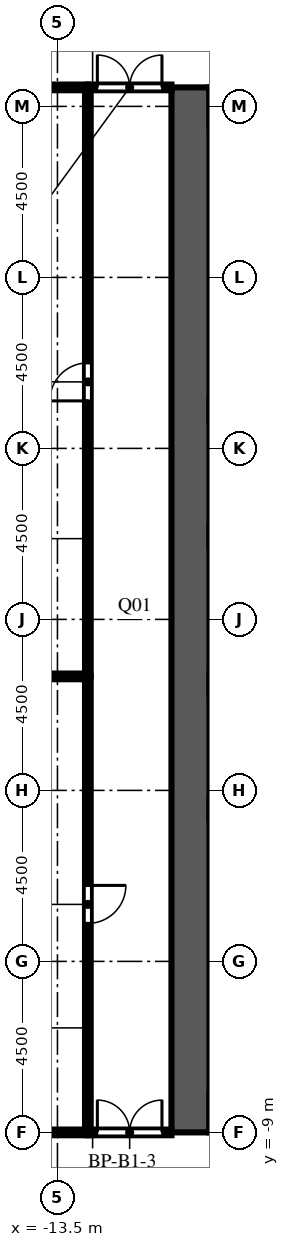
"""IFC4 building model, lengths in metres.
Left out: names, types, materials, properties, quantities, classifications, styles, units other than length and angle.
Written with IfcOpenShell. Run it as: python <this file> out.ifc"""

import sys

from ifc_helpers import new_model, si_unit, direction, frame, frame_2d, origin, place, context, subcontext, project, spatial, rectangle, extrude, element, fill, save


model = new_model("IFC4")
c1 = context("Model", 3, precision=1e-05, world=origin(), true_north=direction((0.0, 1.0)))
c2 = subcontext(c1, "Body", "Model", "MODEL_VIEW")
j1 = project(units=[si_unit("LENGTHUNIT", "METRE"), si_unit("PLANEANGLEUNIT", "RADIAN")], contexts=[c1])
p1 = place(None, origin())
s1 = spatial("IfcSite", under=j1, at=p1, CompositionType="ELEMENT")
p2 = place(p1, origin())
s2 = spatial("IfcBuilding", under=s1, at=p2, CompositionType="ELEMENT")
p3 = place(p2, frame((0.0, 0.0, -5.0)))
s3 = spatial("IfcBuildingStorey", under=s2, at=p3, CompositionType="ELEMENT", Elevation=-5.0)
p4 = place(p3, frame((-10.0, -9.0, 0.0), z_axis=(0.0, 0.0, 1.0), x_axis=(0.0, 1.0, 0.0)))
e1 = element("IfcWall", 1, at=p4, inside=s3, PredefinedType="SHEAR", context=c2, shape_type="SweptSolid", body=[
    extrude(rectangle(XDim=27.5, YDim=1.0, at=frame_2d((13.75, 0.0))), origin(), (0.0, 0.0, 1.0), 5.0),
])
p5 = place(p4, frame((12.55, 0.0, 0.0)))
e2 = element("IfcOpeningElement", 2, at=p5, cuts=e1, PredefinedType="OPENING", context=c2, shape_type="SweptSolid", body=[
    extrude(rectangle(XDim=2.4, YDim=2.4, at=frame_2d((1.2, 1.2))), frame((0.0, 0.51, 0.0), z_axis=(0.0, -1.0, 0.0), x_axis=(1.0, 0.0, 0.0)), (0.0, 0.0, 1.0), 1.02),
])
p6 = place(p4, frame((6.825, 0.0, 0.0)))
e3 = element("IfcOpeningElement", 3, at=p6, cuts=e1, PredefinedType="OPENING", context=c2, shape_type="SweptSolid", body=[
    extrude(rectangle(XDim=1.2, YDim=2.1, at=frame_2d((0.6, 1.05))), frame((0.0, 0.51, 0.0), z_axis=(0.0, -1.0, 0.0), x_axis=(1.0, 0.0, 0.0)), (0.0, 0.0, 1.0), 1.02),
])
p7 = place(p4, frame((19.475, 0.0, 0.0)))
e4 = element("IfcOpeningElement", 4, at=p7, cuts=e1, PredefinedType="OPENING", context=c2, shape_type="SweptSolid", body=[
    extrude(rectangle(XDim=1.2, YDim=2.1, at=frame_2d((0.6, 1.05))), frame((0.0, 0.51, 0.0), z_axis=(0.0, -1.0, 0.0), x_axis=(1.0, 0.0, 0.0)), (0.0, 0.0, 1.0), 1.02),
])
p8 = place(p3, frame((-12.7, -9.0, 0.0), z_axis=(0.0, 0.0, 1.0), x_axis=(1.0, 0.0, 0.0)))
e5 = element("IfcWall", 5, at=p8, inside=s3, PredefinedType="PARTITIONING", context=c2, shape_type="SweptSolid", body=[
    extrude(rectangle(XDim=2.2, YDim=0.15, at=frame_2d((1.1, 0.0))), origin(), (0.0, 0.0, 1.0), 4.5),
])
p9 = place(p8, frame((0.25, 0.0, 0.0)))
e6 = element("IfcOpeningElement", 6, at=p9, cuts=e5, PredefinedType="OPENING", context=c2, shape_type="SweptSolid", body=[
    extrude(rectangle(XDim=1.7, YDim=2.1, at=frame_2d((0.85, 1.05))), frame((0.0, 0.085, 0.0), z_axis=(0.0, -1.0, 0.0), x_axis=(1.0, 0.0, 0.0)), (0.0, 0.0, 1.0), 0.17),
])
p10 = place(p3, frame((-12.7, 18.5, 0.0), z_axis=(0.0, 0.0, 1.0), x_axis=(1.0, 0.0, 0.0)))
e7 = element("IfcWall", 7, at=p10, inside=s3, PredefinedType="PARTITIONING", context=c2, shape_type="SweptSolid", body=[
    extrude(rectangle(XDim=2.2, YDim=0.15, at=frame_2d((1.1, 0.0))), origin(), (0.0, 0.0, 1.0), 4.5),
])
p11 = place(p10, frame((0.25, 0.0, 0.0)))
e8 = element("IfcOpeningElement", 8, at=p11, cuts=e7, PredefinedType="OPENING", context=c2, shape_type="SweptSolid", body=[
    extrude(rectangle(XDim=1.7, YDim=2.1, at=frame_2d((0.85, 1.05))), frame((0.0, 0.085, 0.0), z_axis=(0.0, -1.0, 0.0), x_axis=(1.0, 0.0, 0.0)), (0.0, 0.0, 1.0), 0.17),
])
p12 = place(p3, frame((-12.7, -9.0, 0.0), z_axis=(0.0, 0.0, 1.0), x_axis=(0.0, 1.0, 0.0)))
e9 = element("IfcWall", 9, at=p12, inside=s3, PredefinedType="PARTITIONING", context=c2, shape_type="SweptSolid", body=[
    extrude(rectangle(XDim=12.0, YDim=0.15, at=frame_2d((6.0, 0.0))), origin(), (0.0, 0.0, 1.0), 4.5),
])
p13 = place(p12, frame((5.5, 0.0, 0.0)))
e10 = element("IfcOpeningElement", 10, at=p13, cuts=e9, PredefinedType="OPENING", context=c2, shape_type="SweptSolid", body=[
    extrude(rectangle(XDim=1.0, YDim=2.1, at=frame_2d((0.5, 1.05))), frame((0.0, 0.085, 0.0), z_axis=(0.0, -1.0, 0.0), x_axis=(1.0, 0.0, 0.0)), (0.0, 0.0, 1.0), 0.17),
])
p14 = place(p3, frame((-12.7, 3.0, 0.0), z_axis=(0.0, 0.0, 1.0), x_axis=(0.0, 1.0, 0.0)))
e11 = element("IfcWall", 11, at=p14, inside=s3, PredefinedType="PARTITIONING", context=c2, shape_type="SweptSolid", body=[
    extrude(rectangle(XDim=15.5, YDim=0.15, at=frame_2d((7.75, 0.0))), origin(), (0.0, 0.0, 1.0), 4.5),
])
p15 = place(p14, frame((7.25, 0.0, 0.0)))
e12 = element("IfcOpeningElement", 12, at=p15, cuts=e11, PredefinedType="OPENING", context=c2, shape_type="SweptSolid", body=[
    extrude(rectangle(XDim=1.0, YDim=2.1, at=frame_2d((0.5, 1.05))), frame((0.0, 0.085, 0.0), z_axis=(0.0, -1.0, 0.0), x_axis=(1.0, 0.0, 0.0)), (0.0, 0.0, 1.0), 0.17),
])
for number, where, z_axis, x_axis in (
    (13, (-17.15, -9.0, 0.0), (0.0, 0.0, 1.0), (1.0, 0.0, 0.0)),
    (14, (-17.15, 18.5, 0.0), (0.0, 0.0, 1.0), (1.0, 0.0, 0.0)),
):
    element("IfcWall", number, at=place(p3, frame(where, z_axis=z_axis, x_axis=x_axis)), inside=s3, PredefinedType="PARTITIONING", context=c2, shape_type="SweptSolid", body=[
        extrude(rectangle(XDim=4.45, YDim=0.15, at=frame_2d((2.225, 0.0))), origin(), (0.0, 0.0, 1.0), 4.5),
    ])
p16 = place(p3, frame((-31.2, 3.0, 0.0), z_axis=(0.0, 0.0, 1.0), x_axis=(1.0, 0.0, 0.0)))
e15 = element("IfcWall", 15, at=p16, inside=s3, PredefinedType="PARTITIONING", context=c2, shape_type="SweptSolid", body=[
    extrude(rectangle(XDim=18.5, YDim=0.15, at=frame_2d((9.25, 0.0))), origin(), (0.0, 0.0, 1.0), 4.5),
])
p17 = place(p5, origin())
e16 = element("IfcDoor", 16, at=p17, inside=s3, OperationType="DOUBLE_DOOR_DOUBLE_SWING", PredefinedType="DOOR", context=c2, shape_type="SweptSolid", body=[
    extrude(rectangle(XDim=2.4, YDim=2.4, at=frame_2d((1.2, 1.2))), frame((0.0, 0.025, 0.0), z_axis=(0.0, -1.0, 0.0), x_axis=(1.0, 0.0, 0.0)), (0.0, 0.0, 1.0), 0.05),
])
fill(e2, e16)
p18 = place(p6, origin())
e17 = element("IfcDoor", 17, at=p18, inside=s3, OperationType="SINGLE_SWING_LEFT", PredefinedType="DOOR", context=c2, shape_type="SweptSolid", body=[
    extrude(rectangle(XDim=1.2, YDim=2.1, at=frame_2d((0.6, 1.05))), frame((0.0, 0.025, 0.0), z_axis=(0.0, -1.0, 0.0), x_axis=(1.0, 0.0, 0.0)), (0.0, 0.0, 1.0), 0.05),
])
fill(e3, e17)
p19 = place(p7, origin())
e18 = element("IfcDoor", 18, at=p19, inside=s3, OperationType="SINGLE_SWING_LEFT", PredefinedType="DOOR", context=c2, shape_type="SweptSolid", body=[
    extrude(rectangle(XDim=1.2, YDim=2.1, at=frame_2d((0.6, 1.05))), frame((0.0, 0.025, 0.0), z_axis=(0.0, -1.0, 0.0), x_axis=(1.0, 0.0, 0.0)), (0.0, 0.0, 1.0), 0.05),
])
fill(e4, e18)
p20 = place(p13, origin())
e19 = element("IfcDoor", 19, at=p20, inside=s3, OperationType="SINGLE_SWING_RIGHT", PredefinedType="DOOR", context=c2, shape_type="SweptSolid", body=[
    extrude(rectangle(XDim=1.0, YDim=2.1, at=frame_2d((0.5, 1.05))), frame((0.0, 0.025, 0.0), z_axis=(0.0, -1.0, 0.0), x_axis=(1.0, 0.0, 0.0)), (0.0, 0.0, 1.0), 0.05),
])
fill(e10, e19)
p21 = place(p15, origin())
e20 = element("IfcDoor", 20, at=p21, inside=s3, OperationType="SINGLE_SWING_LEFT", PredefinedType="DOOR", context=c2, shape_type="SweptSolid", body=[
    extrude(rectangle(XDim=1.0, YDim=2.1, at=frame_2d((0.5, 1.05))), frame((0.0, 0.025, 0.0), z_axis=(0.0, -1.0, 0.0), x_axis=(1.0, 0.0, 0.0)), (0.0, 0.0, 1.0), 0.05),
])
fill(e12, e20)
p22 = place(p9, origin())
e21 = element("IfcDoor", 21, at=p22, inside=s3, OperationType="DOUBLE_DOOR_DOUBLE_SWING", PredefinedType="DOOR", context=c2, shape_type="SweptSolid", body=[
    extrude(rectangle(XDim=1.7, YDim=2.1, at=frame_2d((0.85, 1.05))), frame((0.0, 0.025, 0.0), z_axis=(0.0, -1.0, 0.0), x_axis=(1.0, 0.0, 0.0)), (0.0, 0.0, 1.0), 0.05),
])
fill(e6, e21)
p23 = place(p11, origin())
e22 = element("IfcDoor", 22, at=p23, inside=s3, OperationType="DOUBLE_DOOR_DOUBLE_SWING", PredefinedType="DOOR", context=c2, shape_type="SweptSolid", body=[
    extrude(rectangle(XDim=1.7, YDim=2.1, at=frame_2d((0.85, 1.05))), frame((0.0, 0.025, 0.0), z_axis=(0.0, -1.0, 0.0), x_axis=(1.0, 0.0, 0.0)), (0.0, 0.0, 1.0), 0.05),
])
fill(e8, e22)
save(model, sys.argv[1])
